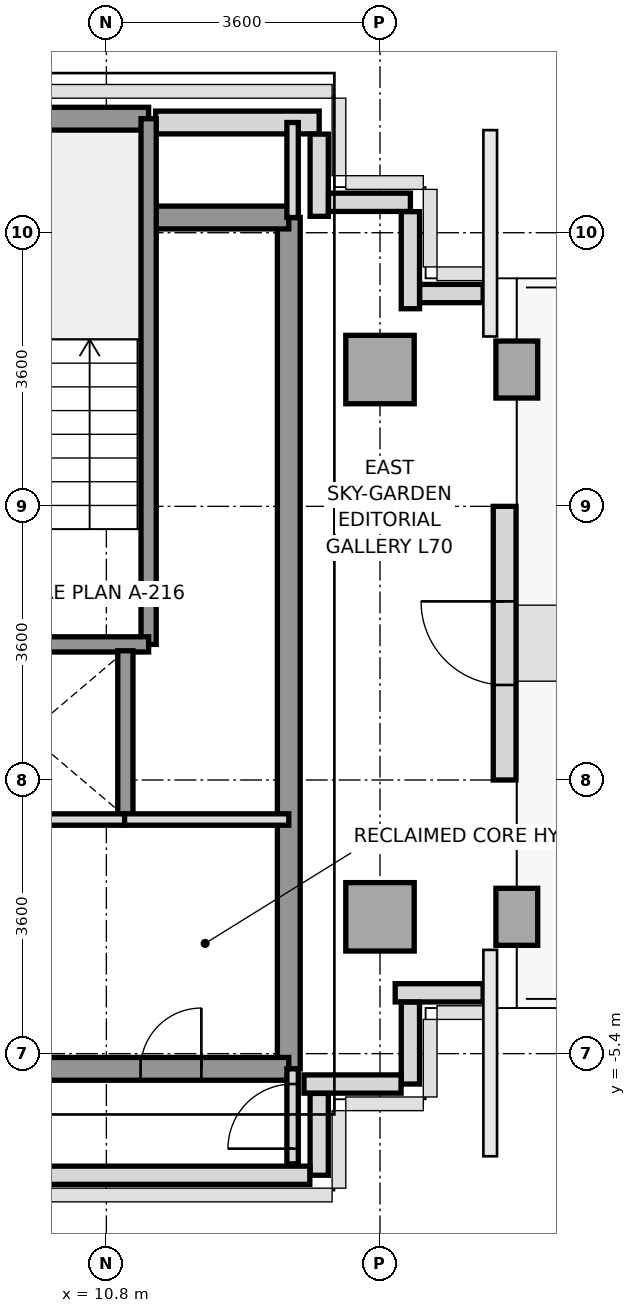
"""IFC4 building model, lengths in metres.
Left out: names, types, materials, properties, quantities, classifications, styles, units other than length and angle.
Written with IfcOpenShell. Run it as: python <this file> out.ifc"""

import sys

from ifc_helpers import new_model, si_unit, direction, frame, frame_2d, origin, origin_2d, place, context, subcontext, project, spatial, rectangle, extrude, source, transform, mapped, element, fill, save


model = new_model("IFC4")
c1 = context("Model", 3, precision=1e-05, world=origin(), true_north=direction((0.0, 1.0)))
c2 = subcontext(c1, "Body", "Model", "MODEL_VIEW")
j1 = project(units=[si_unit("LENGTHUNIT", "METRE"), si_unit("PLANEANGLEUNIT", "RADIAN")], contexts=[c1])
p1 = place(None, origin())
s1 = spatial("IfcSite", under=j1, at=p1, CompositionType="ELEMENT")
p2 = place(p1, origin())
s2 = spatial("IfcBuilding", under=s1, at=p2, CompositionType="ELEMENT")
p3 = place(p2, frame((0.0, 0.0, 252.4)))
s3 = spatial("IfcBuildingStorey", under=s2, at=p3, CompositionType="ELEMENT", Elevation=252.4)
m1 = source(origin(), c2, "Body", "SweptSolid", [
    extrude(rectangle(XDim=0.9, YDim=0.9, at=origin_2d()), origin(), (0.0, 0.0, 1.0), 3.01),
])
for number, where, z_axis, x_axis in (
    (1, (14.4, -3.6, 0.0), (0.0, 0.0, 1.0), (1.0, 0.0, 0.0)),
    (2, (14.4, 3.6, 0.0), (0.0, 0.0, 1.0), (1.0, 0.0, 0.0)),
):
    element("IfcColumn", number, at=place(p3, frame(where, z_axis=z_axis, x_axis=x_axis)), inside=s3, PredefinedType="COLUMN", context=c2, shape_type="MappedRepresentation", body=[
        mapped(m1, transform((0.0, 0.0, 0.0), x_axis=(1.0, 0.0, 0.0), y_axis=(0.0, 1.0, 0.0), z_axis=(0.0, 0.0, 1.0), scale=1.0)),
    ])
m2 = source(origin(), c2, "Body", "SweptSolid", [
    extrude(rectangle(XDim=0.55, YDim=0.75, at=origin_2d()), origin(), (0.0, 0.0, 1.0), 3.01),
])
for number, where, z_axis, x_axis in (
    (3, (16.2, -3.6, 0.0), (0.0, 0.0, 1.0), (1.0, 0.0, 0.0)),
    (4, (16.2, 3.6, 0.0), (0.0, 0.0, 1.0), (1.0, 0.0, 0.0)),
):
    element("IfcColumn", number, at=place(p3, frame(where, z_axis=z_axis, x_axis=x_axis)), inside=s3, PredefinedType="COLUMN", context=c2, shape_type="MappedRepresentation", body=[
        mapped(m2, transform((0.0, 0.0, 0.0), x_axis=(1.0, 0.0, 0.0), y_axis=(0.0, 1.0, 0.0), z_axis=(0.0, 0.0, 1.0), scale=1.0)),
    ])
p4 = place(p3, frame((11.448, 6.85, 0.0), z_axis=(0.0, 0.0, 1.0), x_axis=(1.0, 0.0, 0.0)))
e5 = element("IfcWall", 5, at=p4, inside=s3, PredefinedType="SOLIDWALL", context=c2, shape_type="SweptSolid", body=[
    extrude(rectangle(XDim=2.152, YDim=0.3, at=frame_2d((1.076, 0.0))), origin(), (0.0, 0.0, 1.0), 3.01),
])
p5 = place(p3, frame((16.04, -1.8, 0.0), z_axis=(0.0, 0.0, 1.0), x_axis=(0.0, 1.0, 0.0)))
e6 = element("IfcWall", 6, at=p5, inside=s3, PredefinedType="SOLIDWALL", context=c2, shape_type="SweptSolid", body=[
    extrude(rectangle(XDim=3.6, YDim=0.3, at=frame_2d((1.8, 0.0))), origin(), (0.0, 0.0, 1.0), 2.36),
])
p6 = place(p5, frame((1.25, 0.0, 0.0)))
e7 = element("IfcOpeningElement", 7, at=p6, cuts=e6, PredefinedType="OPENING", context=c2, shape_type="SweptSolid", body=[
    extrude(rectangle(XDim=1.1, YDim=2.3, at=frame_2d((0.55, 1.15))), frame((0.0, 0.16, 0.0), z_axis=(0.0, -1.0, 0.0), x_axis=(1.0, 0.0, 0.0)), (0.0, 0.0, 1.0), 0.32),
])
p7 = place(p3, frame((15.757, -4.6, 0.0), z_axis=(0.0, 0.0, 1.0), x_axis=(-1.0, 0.0, 0.0)))
e8 = element("IfcWall", 8, at=p7, inside=s3, PredefinedType="PARAPET", context=c2, shape_type="SweptSolid", body=[
    extrude(rectangle(XDim=1.157, YDim=0.24, at=frame_2d((0.579, 0.0))), origin(), (0.0, 0.0, 1.0), 1.15),
])
p8 = place(p3, frame((14.8, -4.723, 0.0), z_axis=(0.0, 0.0, 1.0), x_axis=(0.0, -1.0, 0.0)))
e9 = element("IfcWall", 9, at=p8, inside=s3, PredefinedType="PARAPET", context=c2, shape_type="SweptSolid", body=[
    extrude(rectangle(XDim=1.077, YDim=0.24, at=frame_2d((0.539, 0.0))), origin(), (0.0, 0.0, 1.0), 1.15),
])
p9 = place(p3, frame((14.677, -5.8, 0.0), z_axis=(0.0, 0.0, 1.0), x_axis=(-1.0, 0.0, 0.0)))
e10 = element("IfcWall", 10, at=p9, inside=s3, PredefinedType="PARAPET", context=c2, shape_type="SweptSolid", body=[
    extrude(rectangle(XDim=1.277, YDim=0.24, at=frame_2d((0.639, 0.0))), origin(), (0.0, 0.0, 1.0), 1.15),
])
p10 = place(p3, frame((13.6, -5.923, 0.0), z_axis=(0.0, 0.0, 1.0), x_axis=(0.0, -1.0, 0.0)))
e11 = element("IfcWall", 11, at=p10, inside=s3, PredefinedType="PARAPET", context=c2, shape_type="SweptSolid", body=[
    extrude(rectangle(XDim=1.077, YDim=0.24, at=frame_2d((0.539, 0.0))), origin(), (0.0, 0.0, 1.0), 1.15),
])
p11 = place(p3, frame((13.477, -7.0, 0.0), z_axis=(0.0, 0.0, 1.0), x_axis=(-1.0, 0.0, 0.0)))
e12 = element("IfcWall", 12, at=p11, inside=s3, PredefinedType="PARAPET", context=c2, shape_type="SweptSolid", body=[
    extrude(rectangle(XDim=4.199, YDim=0.24, at=frame_2d((2.1, 0.0))), origin(), (0.0, 0.0, 1.0), 1.15),
])
p12 = place(p3, frame((13.6, 6.697, 0.0), z_axis=(0.0, 0.0, 1.0), x_axis=(0.0, -1.0, 0.0)))
e13 = element("IfcWall", 13, at=p12, inside=s3, PredefinedType="PARAPET", context=c2, shape_type="SweptSolid", body=[
    extrude(rectangle(XDim=1.082, YDim=0.24, at=frame_2d((0.541, 0.0))), origin(), (0.0, 0.0, 1.0), 1.15),
])
p13 = place(p3, frame((13.723, 5.8, 0.0), z_axis=(0.0, 0.0, 1.0), x_axis=(1.0, 0.0, 0.0)))
e14 = element("IfcWall", 14, at=p13, inside=s3, PredefinedType="PARAPET", context=c2, shape_type="SweptSolid", body=[
    extrude(rectangle(XDim=1.077, YDim=0.24, at=frame_2d((0.539, 0.0))), origin(), (0.0, 0.0, 1.0), 1.15),
])
p14 = place(p3, frame((14.8, 5.677, 0.0), z_axis=(0.0, 0.0, 1.0), x_axis=(0.0, -1.0, 0.0)))
e15 = element("IfcWall", 15, at=p14, inside=s3, PredefinedType="PARAPET", context=c2, shape_type="SweptSolid", body=[
    extrude(rectangle(XDim=1.277, YDim=0.24, at=frame_2d((0.639, 0.0))), origin(), (0.0, 0.0, 1.0), 1.15),
])
p15 = place(p3, frame((14.923, 4.6, 0.0), z_axis=(0.0, 0.0, 1.0), x_axis=(1.0, 0.0, 0.0)))
e16 = element("IfcWall", 16, at=p15, inside=s3, PredefinedType="PARAPET", context=c2, shape_type="SweptSolid", body=[
    extrude(rectangle(XDim=0.834, YDim=0.24, at=frame_2d((0.417, 0.0))), origin(), (0.0, 0.0, 1.0), 1.15),
])
p16 = place(p3, frame((13.2, -5.6, 0.0), z_axis=(0.0, 0.0, 1.0), x_axis=(0.0, 1.0, 0.0)))
e17 = element("IfcWall", 17, at=p16, inside=s3, PredefinedType="SHEAR", context=c2, shape_type="SweptSolid", body=[
    extrude(rectangle(XDim=11.2, YDim=0.3, at=frame_2d((5.6, 0.0))), origin(), (0.0, 0.0, 1.0), 3.01),
])
p17 = place(p3, frame((5.4, 6.9, 0.0), z_axis=(0.0, 0.0, 1.0), x_axis=(1.0, 0.0, 0.0)))
e18 = element("IfcWall", 18, at=p17, inside=s3, PredefinedType="SHEAR", context=c2, shape_type="SweptSolid", body=[
    extrude(rectangle(XDim=5.956, YDim=0.3, at=frame_2d((2.978, 0.0))), origin(), (0.0, 0.0, 1.0), 3.01),
])
p18 = place(p3, frame((11.356, 5.6, 0.0), z_axis=(0.0, 0.0, 1.0), x_axis=(1.0, 0.0, 0.0)))
e19 = element("IfcWall", 19, at=p18, inside=s3, PredefinedType="SHEAR", context=c2, shape_type="SweptSolid", body=[
    extrude(rectangle(XDim=1.844, YDim=0.3, at=frame_2d((0.922, 0.0))), origin(), (0.0, 0.0, 1.0), 3.01),
])
p19 = place(p3, frame((5.4, -5.6, 0.0), z_axis=(0.0, 0.0, 1.0), x_axis=(1.0, 0.0, 0.0)))
e20 = element("IfcWall", 20, at=p19, inside=s3, PredefinedType="SHEAR", context=c2, shape_type="SweptSolid", body=[
    extrude(rectangle(XDim=7.8, YDim=0.3, at=frame_2d((3.9, 0.0))), origin(), (0.0, 0.0, 1.0), 3.01),
])
p20 = place(p19, frame((5.85, 0.0, 0.0)))
e21 = element("IfcOpeningElement", 21, at=p20, cuts=e20, PredefinedType="OPENING", context=c2, shape_type="SweptSolid", body=[
    extrude(rectangle(XDim=0.8, YDim=2.1, at=frame_2d((0.4, 1.05))), frame((0.0, 0.16, 0.0), z_axis=(0.0, -1.0, 0.0), x_axis=(1.0, 0.0, 0.0)), (0.0, 0.0, 1.0), 0.32),
])
p21 = place(p19, frame((2.65, 0.0, 0.0)))
e22 = element("IfcOpeningElement", 22, at=p21, cuts=e20, PredefinedType="OPENING", context=c2, shape_type="SweptSolid", body=[
    extrude(rectangle(XDim=0.95, YDim=2.15, at=frame_2d((0.475, 1.075))), frame((0.0, 0.16, 0.0), z_axis=(0.0, -1.0, 0.0), x_axis=(1.0, 0.0, 0.0)), (0.0, 0.0, 1.0), 0.32),
])
p22 = place(p3, frame((11.356, -0.016, 0.0), z_axis=(0.0, 0.0, 1.0), x_axis=(0.0, 1.0, 0.0)))
e23 = element("IfcWall", 23, at=p22, inside=s3, PredefinedType="SOLIDWALL", context=c2, shape_type="SweptSolid", body=[
    extrude(rectangle(XDim=6.916, YDim=0.2, at=frame_2d((3.458, 0.0))), origin(), (0.0, 0.0, 1.0), 3.01),
])
p23 = place(p3, frame((8.204, -0.016, 0.0), z_axis=(0.0, 0.0, 1.0), x_axis=(1.0, 0.0, 0.0)))
e24 = element("IfcWall", 24, at=p23, inside=s3, PredefinedType="SOLIDWALL", context=c2, shape_type="SweptSolid", body=[
    extrude(rectangle(XDim=3.152, YDim=0.2, at=frame_2d((1.576, 0.0))), origin(), (0.0, 0.0, 1.0), 3.01),
])
p24 = place(p3, frame((11.05, -2.28, 0.0), z_axis=(0.0, 0.0, 1.0), x_axis=(0.0, 1.0, 0.0)))
e25 = element("IfcWall", 25, at=p24, inside=s3, PredefinedType="SOLIDWALL", context=c2, shape_type="SweptSolid", body=[
    extrude(rectangle(XDim=2.18, YDim=0.2, at=frame_2d((1.09, 0.0))), origin(), (0.0, 0.0, 1.0), 3.01),
])
p25 = place(p3, frame((11.02, -2.32, 0.0), z_axis=(0.0, 0.0, 1.0), x_axis=(1.0, 0.0, 0.0)))
e26 = element("IfcWall", 26, at=p25, inside=s3, PredefinedType="PARTITIONING", context=c2, shape_type="SweptSolid", body=[
    extrude(rectangle(XDim=2.18, YDim=0.15, at=frame_2d((1.09, 0.0))), origin(), (0.0, 0.0, 1.0), 3.01),
])
p26 = place(p3, frame((8.48, -2.32, 0.0), z_axis=(0.0, 0.0, 1.0), x_axis=(1.0, 0.0, 0.0)))
e27 = element("IfcWall", 27, at=p26, inside=s3, PredefinedType="PARTITIONING", context=c2, shape_type="SweptSolid", body=[
    extrude(rectangle(XDim=2.56, YDim=0.15, at=frame_2d((1.28, 0.0))), origin(), (0.0, 0.0, 1.0), 3.01),
])
p27 = place(p3, frame((13.25, 5.6, 0.0), z_axis=(0.0, 0.0, 1.0), x_axis=(0.0, 1.0, 0.0)))
e28 = element("IfcWall", 28, at=p27, inside=s3, PredefinedType="PARTITIONING", context=c2, shape_type="SweptSolid", body=[
    extrude(rectangle(XDim=1.25, YDim=0.15, at=frame_2d((0.625, 0.0))), origin(), (0.0, 0.0, 1.0), 3.01),
])
p28 = place(p3, frame((13.25, -6.85, 0.0), z_axis=(0.0, 0.0, 1.0), x_axis=(0.0, 1.0, 0.0)))
e29 = element("IfcWall", 29, at=p28, inside=s3, PredefinedType="PARTITIONING", context=c2, shape_type="SweptSolid", body=[
    extrude(rectangle(XDim=1.25, YDim=0.15, at=frame_2d((0.625, 0.0))), origin(), (0.0, 0.0, 1.0), 3.01),
])
p29 = place(p28, frame((0.2, 0.0, 0.0)))
e30 = element("IfcOpeningElement", 30, at=p29, cuts=e29, PredefinedType="OPENING", context=c2, shape_type="SweptSolid", body=[
    extrude(rectangle(XDim=0.85, YDim=2.1, at=frame_2d((0.425, 1.05))), frame((0.0, 0.085, 0.0), z_axis=(0.0, -1.0, 0.0), x_axis=(1.0, 0.0, 0.0)), (0.0, 0.0, 1.0), 0.17),
])
m3 = source(origin(), c2, "Body", "SweptSolid", [
    extrude(rectangle(XDim=1.1, YDim=2.3, at=frame_2d((0.55, 1.15))), frame((0.0, 0.025, 0.0), z_axis=(0.0, -1.0, 0.0), x_axis=(1.0, 0.0, 0.0)), (0.0, 0.0, 1.0), 0.05),
])
p30 = place(p6, frame((1.1, 0.0, 0.0), z_axis=(0.0, 0.0, 1.0), x_axis=(-1.0, 0.0, 0.0)))
e31 = element("IfcDoor", 31, at=p30, inside=s3, OperationType="SINGLE_SWING_RIGHT", PredefinedType="DOOR", context=c2, shape_type="MappedRepresentation", body=[
    mapped(m3, transform((0.0, 0.0, 0.0), x_axis=(1.0, 0.0, 0.0), y_axis=(0.0, 1.0, 0.0), z_axis=(0.0, 0.0, 1.0), scale=1.0)),
])
fill(e7, e31)
m4 = source(origin(), c2, "Body", "SweptSolid", [
    extrude(rectangle(XDim=0.8, YDim=2.1, at=frame_2d((0.4, 1.05))), frame((0.0, 0.025, 0.0), z_axis=(0.0, -1.0, 0.0), x_axis=(1.0, 0.0, 0.0)), (0.0, 0.0, 1.0), 0.05),
])
p31 = place(p20, origin())
e32 = element("IfcDoor", 32, at=p31, inside=s3, OperationType="SINGLE_SWING_RIGHT", PredefinedType="DOOR", context=c2, shape_type="MappedRepresentation", body=[
    mapped(m4, transform((0.0, 0.0, 0.0), x_axis=(1.0, 0.0, 0.0), y_axis=(0.0, 1.0, 0.0), z_axis=(0.0, 0.0, 1.0), scale=1.0)),
])
fill(e21, e32)
m5 = source(origin(), c2, "Body", "SweptSolid", [
    extrude(rectangle(XDim=0.85, YDim=2.1, at=frame_2d((0.425, 1.05))), frame((0.0, 0.025, 0.0), z_axis=(0.0, -1.0, 0.0), x_axis=(1.0, 0.0, 0.0)), (0.0, 0.0, 1.0), 0.05),
])
p32 = place(p29, origin())
e33 = element("IfcDoor", 33, at=p32, inside=s3, OperationType="SINGLE_SWING_LEFT", PredefinedType="DOOR", context=c2, shape_type="MappedRepresentation", body=[
    mapped(m5, transform((0.0, 0.0, 0.0), x_axis=(1.0, 0.0, 0.0), y_axis=(0.0, 1.0, 0.0), z_axis=(0.0, 0.0, 1.0), scale=1.0)),
])
fill(e30, e33)
save(model, sys.argv[1])
